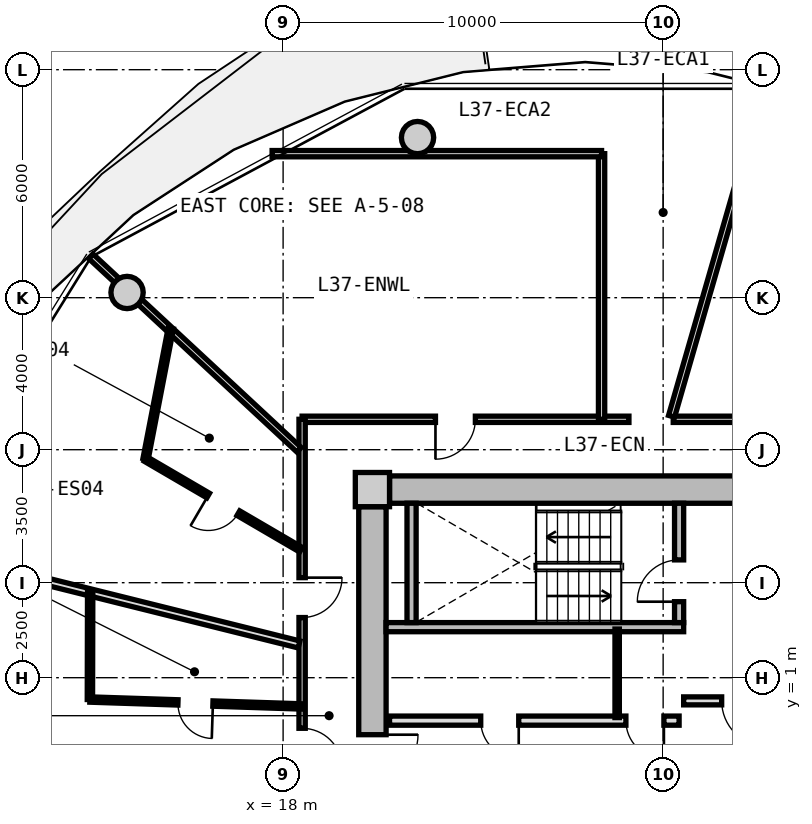
"""IFC4 building model, lengths in metres.
Left out: names, types, materials, properties, quantities, classifications, styles, units other than length and angle.
Written with IfcOpenShell. Run it as: python <this file> out.ifc"""

import sys

from ifc_helpers import new_model, si_unit, direction, frame, frame_2d, origin, origin_2d, place, context, subcontext, project, spatial, rectangle, circle, extrude, source, transform, mapped, element, fill, save


model = new_model("IFC4")
c1 = context("Model", 3, precision=1e-05, world=origin(), true_north=direction((0.0, 1.0)))
c2 = subcontext(c1, "Body", "Model", "MODEL_VIEW")
j1 = project(units=[si_unit("LENGTHUNIT", "METRE"), si_unit("PLANEANGLEUNIT", "RADIAN")], contexts=[c1])
p1 = place(None, origin())
s1 = spatial("IfcSite", under=j1, at=p1, CompositionType="ELEMENT")
p2 = place(p1, origin())
s2 = spatial("IfcBuilding", under=s1, at=p2, CompositionType="ELEMENT")
p3 = place(p2, frame((0.0, 0.0, 120.65)))
s3 = spatial("IfcBuildingStorey", under=s2, at=p3, CompositionType="ELEMENT", Elevation=120.65)
m1 = source(origin(), c2, "Body", "SweptSolid", [
    extrude(rectangle(XDim=0.9, YDim=0.9, at=origin_2d()), origin(), (0.0, 0.0, 1.0), 3.05),
])
p4 = place(p3, frame((20.35, 5.95, 0.0), z_axis=(0.0, 0.0, 1.0), x_axis=(1.0, 0.0, 0.0)))
e1 = element("IfcColumn", 1, at=p4, inside=s3, PredefinedType="COLUMN", context=c2, shape_type="MappedRepresentation", body=[
    mapped(m1, transform((0.0, 0.0, 0.0), x_axis=(1.0, 0.0, 0.0), y_axis=(0.0, 1.0, 0.0), z_axis=(0.0, 0.0, 1.0), scale=1.0)),
])
m2 = source(origin(), c2, "Body", "SweptSolid", [
    extrude(rectangle(XDim=14.4, YDim=0.72, at=frame_2d((7.2, 0.0))), origin(), (0.0, 0.0, 1.0), 2.79),
])
p5 = place(p3, frame((20.8, 5.95, 0.0), z_axis=(0.0, 0.0, 1.0), x_axis=(1.0, 0.0, 0.0)))
e2 = element("IfcWall", 2, at=p5, inside=s3, PredefinedType="SHEAR", context=c2, shape_type="MappedRepresentation", body=[
    mapped(m2, transform((0.0, 0.0, 0.0), x_axis=(1.0, 0.0, 0.0), y_axis=(0.0, 1.0, 0.0), z_axis=(0.0, 0.0, 1.0), scale=1.0)),
])
m3 = source(origin(), c2, "Body", "SweptSolid", [
    extrude(rectangle(XDim=11.0, YDim=0.72, at=frame_2d((5.5, 0.0))), origin(), (0.0, 0.0, 1.0), 2.79),
])
p6 = place(p3, frame((20.35, -5.5, 0.0), z_axis=(0.0, 0.0, 1.0), x_axis=(0.0, 1.0, 0.0)))
e3 = element("IfcWall", 3, at=p6, inside=s3, PredefinedType="SHEAR", context=c2, shape_type="MappedRepresentation", body=[
    mapped(m3, transform((0.0, 0.0, 0.0), x_axis=(1.0, 0.0, 0.0), y_axis=(0.0, 1.0, 0.0), z_axis=(0.0, 0.0, 1.0), scale=1.0)),
])
p7 = place(p6, frame((3.8, 0.0, 0.0)))
e4 = element("IfcOpeningElement", 4, at=p7, cuts=e3, PredefinedType="OPENING", context=c2, shape_type="SweptSolid", body=[
    extrude(rectangle(XDim=1.2, YDim=2.15, at=frame_2d((0.6, 1.075))), frame((0.0, 0.37, 0.0), z_axis=(0.0, -1.0, 0.0), x_axis=(1.0, 0.0, 0.0)), (0.0, 0.0, 1.0), 0.74),
])
m4 = source(origin(), c2, "Body", "SweptSolid", [
    extrude(circle(Radius=0.425, at=origin_2d()), origin(), (0.0, 0.0, 1.0), 3.05),
])
for number, where, z_axis, x_axis in (
    (5, (21.537, 15.213, 0.0), (0.0, 0.0, 1.0), (1.0, 0.0, 0.0)),
    (6, (13.894, 11.137, 0.0), (0.0, 0.0, 1.0), (1.0, 0.0, 0.0)),
):
    element("IfcColumn", number, at=place(p3, frame(where, z_axis=z_axis, x_axis=x_axis)), inside=s3, PredefinedType="COLUMN", context=c2, shape_type="MappedRepresentation", body=[
        mapped(m4, transform((0.0, 0.0, 0.0), x_axis=(1.0, 0.0, 0.0), y_axis=(0.0, 1.0, 0.0), z_axis=(0.0, 0.0, 1.0), scale=1.0)),
    ])
m5 = source(origin(), c2, "Body", "SweptSolid", [
    extrude(rectangle(XDim=7.83, YDim=0.24, at=frame_2d((3.915, 0.0))), origin(), (0.0, 0.0, 1.0), 2.79),
])
p8 = place(p3, frame((20.71, 2.33, 0.0), z_axis=(0.0, 0.0, 1.0), x_axis=(1.0, 0.0, 0.0)))
e7 = element("IfcWall", 7, at=p8, inside=s3, PredefinedType="PARTITIONING", context=c2, shape_type="MappedRepresentation", body=[
    mapped(m5, transform((0.0, 0.0, 0.0), x_axis=(1.0, 0.0, 0.0), y_axis=(0.0, 1.0, 0.0), z_axis=(0.0, 0.0, 1.0), scale=1.0)),
])
m6 = source(origin(), c2, "Body", "SweptSolid", [
    extrude(rectangle(XDim=3.14, YDim=0.24, at=frame_2d((1.57, 0.0))), origin(), (0.0, 0.0, 1.0), 2.79),
])
p9 = place(p3, frame((21.38, 2.45, 0.0), z_axis=(0.0, 0.0, 1.0), x_axis=(0.0, 1.0, 0.0)))
e8 = element("IfcWall", 8, at=p9, inside=s3, PredefinedType="PARTITIONING", context=c2, shape_type="MappedRepresentation", body=[
    mapped(m6, transform((0.0, 0.0, 0.0), x_axis=(1.0, 0.0, 0.0), y_axis=(0.0, 1.0, 0.0), z_axis=(0.0, 0.0, 1.0), scale=1.0)),
])
p10 = place(p3, frame((28.42, 2.45, 0.0), z_axis=(0.0, 0.0, 1.0), x_axis=(0.0, 1.0, 0.0)))
e9 = element("IfcWall", 9, at=p10, inside=s3, PredefinedType="PARTITIONING", context=c2, shape_type="MappedRepresentation", body=[
    mapped(m6, transform((0.0, 0.0, 0.0), x_axis=(1.0, 0.0, 0.0), y_axis=(0.0, 1.0, 0.0), z_axis=(0.0, 0.0, 1.0), scale=1.0)),
])
p11 = place(p10, frame((0.55, 0.0, 0.0)))
e10 = element("IfcOpeningElement", 10, at=p11, cuts=e9, PredefinedType="OPENING", context=c2, shape_type="SweptSolid", body=[
    extrude(rectangle(XDim=1.1, YDim=2.15, at=frame_2d((0.55, 1.075))), frame((0.0, 0.13, 0.0), z_axis=(0.0, -1.0, 0.0), x_axis=(1.0, 0.0, 0.0)), (0.0, 0.0, 1.0), 0.26),
])
m7 = source(origin(), c2, "Body", "SweptSolid", [
    extrude(rectangle(XDim=6.66, YDim=0.21, at=frame_2d((3.33, 0.0))), origin(), (0.0, 0.0, 1.0), 2.775),
])
p12 = place(p3, frame((28.54, 0.39, 0.0), z_axis=(0.0, 0.0, 1.0), x_axis=(1.0, 0.0, 0.0)))
e11 = element("IfcWall", 11, at=p12, inside=s3, PredefinedType="PARTITIONING", context=c2, shape_type="MappedRepresentation", body=[
    mapped(m7, transform((0.0, 0.0, 0.0), x_axis=(1.0, 0.0, 0.0), y_axis=(0.0, 1.0, 0.0), z_axis=(0.0, 0.0, 1.0), scale=1.0)),
])
p13 = place(p12, frame((1.0, 0.0, 0.0)))
e12 = element("IfcOpeningElement", 12, at=p13, cuts=e11, PredefinedType="OPENING", context=c2, shape_type="SweptSolid", body=[
    extrude(rectangle(XDim=1.2, YDim=2.15, at=frame_2d((0.6, 1.075))), frame((0.0, 0.115, 0.0), z_axis=(0.0, -1.0, 0.0), x_axis=(1.0, 0.0, 0.0)), (0.0, 0.0, 1.0), 0.23),
])
m8 = source(origin(), c2, "Body", "SweptSolid", [
    extrude(rectangle(XDim=7.62, YDim=0.24, at=frame_2d((3.81, 0.0))), origin(), (0.0, 0.0, 1.0), 2.775),
])
p14 = place(p3, frame((20.8, -0.13, 0.0), z_axis=(0.0, 0.0, 1.0), x_axis=(1.0, 0.0, 0.0)))
e13 = element("IfcWall", 13, at=p14, inside=s3, PredefinedType="PARTITIONING", context=c2, shape_type="MappedRepresentation", body=[
    mapped(m8, transform((0.0, 0.0, 0.0), x_axis=(1.0, 0.0, 0.0), y_axis=(0.0, 1.0, 0.0), z_axis=(0.0, 0.0, 1.0), scale=1.0)),
])
p15 = place(p14, frame((6.22, 0.0, 0.0)))
e14 = element("IfcOpeningElement", 14, at=p15, cuts=e13, PredefinedType="OPENING", context=c2, shape_type="SweptSolid", body=[
    extrude(rectangle(XDim=1.0, YDim=2.1, at=frame_2d((0.5, 1.05))), frame((0.0, 0.13, 0.0), z_axis=(0.0, -1.0, 0.0), x_axis=(1.0, 0.0, 0.0)), (0.0, 0.0, 1.0), 0.26),
])
p16 = place(p14, frame((2.4, 0.0, 0.0)))
e15 = element("IfcOpeningElement", 15, at=p16, cuts=e13, PredefinedType="OPENING", context=c2, shape_type="SweptSolid", body=[
    extrude(rectangle(XDim=1.0, YDim=2.1, at=frame_2d((0.5, 1.05))), frame((0.0, 0.13, 0.0), z_axis=(0.0, -1.0, 0.0), x_axis=(1.0, 0.0, 0.0)), (0.0, 0.0, 1.0), 0.26),
])
m9 = source(origin(), c2, "Body", "SweptSolid", [
    extrude(rectangle(XDim=2.33, YDim=0.115, at=frame_2d((1.165, 0.0))), origin(), (0.0, 0.0, 1.0), 2.775),
])
p17 = place(p3, frame((26.79, -0.05, 0.0), z_axis=(0.0, 0.0, 1.0), x_axis=(0.0, 1.0, 0.0)))
e16 = element("IfcWall", 16, at=p17, inside=s3, PredefinedType="PARTITIONING", context=c2, shape_type="MappedRepresentation", body=[
    mapped(m9, transform((0.0, 0.0, 0.0), x_axis=(1.0, 0.0, 0.0), y_axis=(0.0, 1.0, 0.0), z_axis=(0.0, 0.0, 1.0), scale=1.0)),
])
m10 = source(origin(), c2, "Body", "SweptSolid", [
    extrude(rectangle(XDim=8.6, YDim=0.165, at=frame_2d((4.3, 0.0))), origin(), (0.0, 0.0, 1.0), 2.775),
])
p18 = place(p3, frame((18.5, 7.8, 0.0), z_axis=(0.0, 0.0, 1.0), x_axis=(1.0, 0.0, 0.0)))
e17 = element("IfcWall", 17, at=p18, inside=s3, PredefinedType="PARTITIONING", context=c2, shape_type="MappedRepresentation", body=[
    mapped(m10, transform((0.0, 0.0, 0.0), x_axis=(1.0, 0.0, 0.0), y_axis=(0.0, 1.0, 0.0), z_axis=(0.0, 0.0, 1.0), scale=1.0)),
])
p19 = place(p18, frame((3.509, 0.0, 0.0)))
e18 = element("IfcOpeningElement", 18, at=p19, cuts=e17, PredefinedType="OPENING", context=c2, shape_type="SweptSolid", body=[
    extrude(rectangle(XDim=1.05, YDim=2.15, at=frame_2d((0.525, 1.075))), frame((0.0, 0.093, 0.0), z_axis=(0.0, -1.0, 0.0), x_axis=(1.0, 0.0, 0.0)), (0.0, 0.0, 1.0), 0.185),
])
m11 = source(origin(), c2, "Body", "SweptSolid", [
    extrude(rectangle(XDim=9.234, YDim=0.165, at=frame_2d((4.617, 0.0))), origin(), (0.0, 0.0, 1.0), 2.775),
])
p20 = place(p3, frame((28.266, 7.8, 0.0), z_axis=(0.0, 0.0, 1.0), x_axis=(1.0, 0.0, 0.0)))
e19 = element("IfcWall", 19, at=p20, inside=s3, PredefinedType="PARTITIONING", context=c2, shape_type="MappedRepresentation", body=[
    mapped(m11, transform((0.0, 0.0, 0.0), x_axis=(1.0, 0.0, 0.0), y_axis=(0.0, 1.0, 0.0), z_axis=(0.0, 0.0, 1.0), scale=1.0)),
])
p21 = place(p20, frame((7.074, 0.0, 0.0)))
e20 = element("IfcOpeningElement", 20, at=p21, cuts=e19, PredefinedType="OPENING", context=c2, shape_type="SweptSolid", body=[
    extrude(rectangle(XDim=0.92, YDim=2.1, at=frame_2d((0.46, 1.05))), frame((0.0, 0.093, 0.0), z_axis=(0.0, -1.0, 0.0), x_axis=(1.0, 0.0, 0.0)), (0.0, 0.0, 1.0), 0.185),
])
p22 = place(p20, frame((2.588, 0.0, 0.0)))
e21 = element("IfcOpeningElement", 21, at=p22, cuts=e19, PredefinedType="OPENING", context=c2, shape_type="SweptSolid", body=[
    extrude(rectangle(XDim=1.25, YDim=2.2, at=frame_2d((0.625, 1.1))), frame((0.0, 0.093, 0.0), z_axis=(0.0, -1.0, 0.0), x_axis=(1.0, 0.0, 0.0)), (0.0, 0.0, 1.0), 0.185),
])
m12 = source(origin(), c2, "Body", "SweptSolid", [
    extrude(rectangle(XDim=15.6, YDim=0.165, at=frame_2d((7.8, 0.0))), origin(), (0.0, 0.0, 1.0), 2.775),
])
p23 = place(p3, frame((18.5, -7.8, 0.0), z_axis=(0.0, 0.0, 1.0), x_axis=(0.0, 1.0, 0.0)))
e22 = element("IfcWall", 22, at=p23, inside=s3, PredefinedType="PARTITIONING", context=c2, shape_type="MappedRepresentation", body=[
    mapped(m12, transform((0.0, 0.0, 0.0), x_axis=(1.0, 0.0, 0.0), y_axis=(0.0, 1.0, 0.0), z_axis=(0.0, 0.0, 1.0), scale=1.0)),
])
p24 = place(p23, frame((10.383, 0.0, 0.0)))
e23 = element("IfcOpeningElement", 23, at=p24, cuts=e22, PredefinedType="OPENING", context=c2, shape_type="SweptSolid", body=[
    extrude(rectangle(XDim=1.05, YDim=2.15, at=frame_2d((0.525, 1.075))), frame((0.0, 0.093, 0.0), z_axis=(0.0, -1.0, 0.0), x_axis=(1.0, 0.0, 0.0)), (0.0, 0.0, 1.0), 0.185),
])
p25 = place(p23, frame((6.419, 0.0, 0.0)))
e24 = element("IfcOpeningElement", 24, at=p25, cuts=e22, PredefinedType="OPENING", context=c2, shape_type="SweptSolid", body=[
    extrude(rectangle(XDim=1.05, YDim=2.15, at=frame_2d((0.525, 1.075))), frame((0.0, 0.093, 0.0), z_axis=(0.0, -1.0, 0.0), x_axis=(1.0, 0.0, 0.0)), (0.0, 0.0, 1.0), 0.185),
])
m13 = source(origin(), c2, "Body", "SweptSolid", [
    extrude(rectangle(XDim=8.989, YDim=0.165, at=frame_2d((4.495, 0.0))), origin(), (0.0, 0.0, 1.0), 2.275),
])
p26 = place(p3, frame((28.222, 7.88, 0.0), z_axis=(0.0, 0.0, 1.0), x_axis=(0.27702323008, 0.960863221274, 0.0)))
e25 = element("IfcWall", 25, at=p26, inside=s3, PredefinedType="PARTITIONING", context=c2, shape_type="MappedRepresentation", body=[
    mapped(m13, transform((0.0, 0.0, 0.0), x_axis=(1.0, 0.0, 0.0), y_axis=(0.0, 1.0, 0.0), z_axis=(0.0, 0.0, 1.0), scale=1.0)),
])
m14 = source(origin(), c2, "Body", "SweptSolid", [
    extrude(rectangle(XDim=7.482, YDim=0.165, at=frame_2d((3.741, 0.0))), origin(), (0.0, 0.0, 1.0), 2.275),
])
p27 = place(p3, frame((18.42, 6.998, 0.0), z_axis=(0.0, 0.0, 1.0), x_axis=(-0.732508698043, 0.680757671489, 0.0)))
e26 = element("IfcWall", 26, at=p27, inside=s3, PredefinedType="PARTITIONING", context=c2, shape_type="MappedRepresentation", body=[
    mapped(m14, transform((0.0, 0.0, 0.0), x_axis=(1.0, 0.0, 0.0), y_axis=(0.0, 1.0, 0.0), z_axis=(0.0, 0.0, 1.0), scale=1.0)),
])
m15 = source(origin(), c2, "Body", "SweptSolid", [
    extrude(rectangle(XDim=6.99, YDim=0.165, at=frame_2d((3.495, 0.0))), origin(), (0.0, 0.0, 1.0), 2.775),
])
p28 = place(p3, frame((26.38, 7.8, 0.0), z_axis=(0.0, 0.0, 1.0), x_axis=(0.0, 1.0, 0.0)))
e27 = element("IfcWall", 27, at=p28, inside=s3, PredefinedType="PARTITIONING", context=c2, shape_type="MappedRepresentation", body=[
    mapped(m15, transform((0.0, 0.0, 0.0), x_axis=(1.0, 0.0, 0.0), y_axis=(0.0, 1.0, 0.0), z_axis=(0.0, 0.0, 1.0), scale=1.0)),
])
m16 = source(origin(), c2, "Body", "SweptSolid", [
    extrude(rectangle(XDim=8.669, YDim=0.165, at=frame_2d((4.335, 0.0))), origin(), (0.0, 0.0, 1.0), 2.775),
])
p29 = place(p3, frame((17.71, 14.79, 0.0), z_axis=(0.0, 0.0, 1.0), x_axis=(1.0, 0.0, 0.0)))
e28 = element("IfcWall", 28, at=p29, inside=s3, PredefinedType="PARTITIONING", context=c2, shape_type="MappedRepresentation", body=[
    mapped(m16, transform((0.0, 0.0, 0.0), x_axis=(1.0, 0.0, 0.0), y_axis=(0.0, 1.0, 0.0), z_axis=(0.0, 0.0, 1.0), scale=1.0)),
])
m17 = source(origin(), c2, "Body", "SweptSolid", [
    extrude(rectangle(XDim=10.556, YDim=0.19, at=frame_2d((5.278, 0.0))), origin(), (0.0, 0.0, 1.0), 2.275),
])
p30 = place(p3, frame((18.42, 1.875, 0.0), z_axis=(0.0, 0.0, 1.0), x_axis=(-0.970363857851, 0.241648470667, 0.0)))
e29 = element("IfcWall", 29, at=p30, inside=s3, PredefinedType="PARTITIONING", context=c2, shape_type="MappedRepresentation", body=[
    mapped(m17, transform((0.0, 0.0, 0.0), x_axis=(1.0, 0.0, 0.0), y_axis=(0.0, 1.0, 0.0), z_axis=(0.0, 0.0, 1.0), scale=1.0)),
])
m18 = source(origin(), c2, "Body", "SweptSolid", [
    extrude(rectangle(XDim=4.735, YDim=0.14, at=frame_2d((2.368, 0.0))), origin(), (0.0, 0.0, 1.0), 2.775),
])
p31 = place(p3, frame((18.47, 4.368, 0.0), z_axis=(0.0, 0.0, 1.0), x_axis=(-0.863537576642, 0.504284496814, 0.0)))
e30 = element("IfcWall", 30, at=p31, inside=s3, PredefinedType="PARTITIONING", context=c2, shape_type="MappedRepresentation", body=[
    mapped(m18, transform((0.0, 0.0, 0.0), x_axis=(1.0, 0.0, 0.0), y_axis=(0.0, 1.0, 0.0), z_axis=(0.0, 0.0, 1.0), scale=1.0)),
])
p32 = place(p31, frame((1.908, 0.0, 0.0)))
e31 = element("IfcOpeningElement", 31, at=p32, cuts=e30, PredefinedType="OPENING", context=c2, shape_type="SweptSolid", body=[
    extrude(rectangle(XDim=0.92, YDim=2.1, at=frame_2d((0.46, 1.05))), frame((0.0, 0.08, 0.0), z_axis=(0.0, -1.0, 0.0), x_axis=(1.0, 0.0, 0.0)), (0.0, 0.0, 1.0), 0.16),
])
m19 = source(origin(), c2, "Body", "SweptSolid", [
    extrude(rectangle(XDim=3.499, YDim=0.14, at=frame_2d((1.75, 0.0))), origin(), (0.0, 0.0, 1.0), 2.775),
])
p33 = place(p3, frame((14.381, 6.756, 0.0), z_axis=(0.0, 0.0, 1.0), x_axis=(0.18957713629, 0.981865830649, 0.0)))
e32 = element("IfcWall", 32, at=p33, inside=s3, PredefinedType="PARTITIONING", context=c2, shape_type="MappedRepresentation", body=[
    mapped(m19, transform((0.0, 0.0, 0.0), x_axis=(1.0, 0.0, 0.0), y_axis=(0.0, 1.0, 0.0), z_axis=(0.0, 0.0, 1.0), scale=1.0)),
])
m20 = source(origin(), c2, "Body", "SweptSolid", [
    extrude(rectangle(XDim=5.557, YDim=0.14, at=frame_2d((2.778, 0.0))), origin(), (0.0, 0.0, 1.0), 2.775),
])
p34 = place(p3, frame((18.47, 0.244, 0.0), z_axis=(0.0, 0.0, 1.0), x_axis=(-0.999468495627, 0.03259948234, 0.0)))
e33 = element("IfcWall", 33, at=p34, inside=s3, PredefinedType="PARTITIONING", context=c2, shape_type="MappedRepresentation", body=[
    mapped(m20, transform((0.0, 0.0, 0.0), x_axis=(1.0, 0.0, 0.0), y_axis=(0.0, 1.0, 0.0), z_axis=(0.0, 0.0, 1.0), scale=1.0)),
])
p35 = place(p34, frame((2.318, 0.0, 0.0)))
e34 = element("IfcOpeningElement", 34, at=p35, cuts=e33, PredefinedType="OPENING", context=c2, shape_type="SweptSolid", body=[
    extrude(rectangle(XDim=0.92, YDim=2.1, at=frame_2d((0.46, 1.05))), frame((0.0, 0.08, 0.0), z_axis=(0.0, -1.0, 0.0), x_axis=(1.0, 0.0, 0.0)), (0.0, 0.0, 1.0), 0.16),
])
m21 = source(origin(), c2, "Body", "SweptSolid", [
    extrude(rectangle(XDim=2.837, YDim=0.14, at=frame_2d((1.418, 0.0))), origin(), (0.0, 0.0, 1.0), 2.775),
])
p36 = place(p3, frame((12.916, 0.425, 0.0), z_axis=(0.0, 0.0, 1.0), x_axis=(0.002409838945, 0.999997096334, 0.0)))
e35 = element("IfcWall", 35, at=p36, inside=s3, PredefinedType="PARTITIONING", context=c2, shape_type="MappedRepresentation", body=[
    mapped(m21, transform((0.0, 0.0, 0.0), x_axis=(1.0, 0.0, 0.0), y_axis=(0.0, 1.0, 0.0), z_axis=(0.0, 0.0, 1.0), scale=1.0)),
])
m22 = source(origin(), c2, "Body", "SweptSolid", [
    extrude(rectangle(XDim=1.1, YDim=2.15, at=frame_2d((0.55, 1.075))), frame((0.0, 0.025, 0.0), z_axis=(0.0, -1.0, 0.0), x_axis=(1.0, 0.0, 0.0)), (0.0, 0.0, 1.0), 0.05),
])
p37 = place(p11, origin())
e36 = element("IfcDoor", 36, at=p37, inside=s3, OperationType="SINGLE_SWING_LEFT", PredefinedType="DOOR", context=c2, shape_type="MappedRepresentation", body=[
    mapped(m22, transform((0.0, 0.0, 0.0), x_axis=(1.0, 0.0, 0.0), y_axis=(0.0, 1.0, 0.0), z_axis=(0.0, 0.0, 1.0), scale=1.0)),
])
fill(e10, e36)
m23 = source(origin(), c2, "Body", "SweptSolid", [
    extrude(rectangle(XDim=1.2, YDim=2.15, at=frame_2d((0.6, 1.075))), frame((0.0, 0.025, 0.0), z_axis=(0.0, -1.0, 0.0), x_axis=(1.0, 0.0, 0.0)), (0.0, 0.0, 1.0), 0.05),
])
p38 = place(p13, frame((1.2, 0.0, 0.0), z_axis=(0.0, 0.0, 1.0), x_axis=(-1.0, 0.0, 0.0)))
e37 = element("IfcDoor", 37, at=p38, inside=s3, OperationType="SINGLE_SWING_LEFT", PredefinedType="DOOR", context=c2, shape_type="MappedRepresentation", body=[
    mapped(m23, transform((0.0, 0.0, 0.0), x_axis=(1.0, 0.0, 0.0), y_axis=(0.0, 1.0, 0.0), z_axis=(0.0, 0.0, 1.0), scale=1.0)),
])
fill(e12, e37)
p39 = place(p7, frame((1.2, 0.0, 0.0), z_axis=(0.0, 0.0, 1.0), x_axis=(-1.0, 0.0, 0.0)))
e38 = element("IfcDoor", 38, at=p39, inside=s3, OperationType="SINGLE_SWING_LEFT", PredefinedType="DOOR", context=c2, shape_type="MappedRepresentation", body=[
    mapped(m23, transform((0.0, 0.0, 0.0), x_axis=(1.0, 0.0, 0.0), y_axis=(0.0, 1.0, 0.0), z_axis=(0.0, 0.0, 1.0), scale=1.0)),
])
fill(e4, e38)
m24 = source(origin(), c2, "Body", "SweptSolid", [
    extrude(rectangle(XDim=1.0, YDim=2.1, at=frame_2d((0.5, 1.05))), frame((0.0, 0.025, 0.0), z_axis=(0.0, -1.0, 0.0), x_axis=(1.0, 0.0, 0.0)), (0.0, 0.0, 1.0), 0.05),
])
p40 = place(p15, frame((1.0, 0.0, 0.0), z_axis=(0.0, 0.0, 1.0), x_axis=(-1.0, 0.0, 0.0)))
e39 = element("IfcDoor", 39, at=p40, inside=s3, OperationType="SINGLE_SWING_LEFT", PredefinedType="DOOR", context=c2, shape_type="MappedRepresentation", body=[
    mapped(m24, transform((0.0, 0.0, 0.0), x_axis=(1.0, 0.0, 0.0), y_axis=(0.0, 1.0, 0.0), z_axis=(0.0, 0.0, 1.0), scale=1.0)),
])
fill(e14, e39)
p41 = place(p16, frame((1.0, 0.0, 0.0), z_axis=(0.0, 0.0, 1.0), x_axis=(-1.0, 0.0, 0.0)))
e40 = element("IfcDoor", 40, at=p41, inside=s3, OperationType="SINGLE_SWING_LEFT", PredefinedType="DOOR", context=c2, shape_type="MappedRepresentation", body=[
    mapped(m24, transform((0.0, 0.0, 0.0), x_axis=(1.0, 0.0, 0.0), y_axis=(0.0, 1.0, 0.0), z_axis=(0.0, 0.0, 1.0), scale=1.0)),
])
fill(e15, e40)
m25 = source(origin(), c2, "Body", "SweptSolid", [
    extrude(rectangle(XDim=1.05, YDim=2.15, at=frame_2d((0.525, 1.075))), frame((0.0, 0.025, 0.0), z_axis=(0.0, -1.0, 0.0), x_axis=(1.0, 0.0, 0.0)), (0.0, 0.0, 1.0), 0.05),
])
p42 = place(p19, frame((1.05, 0.0, 0.0), z_axis=(0.0, 0.0, 1.0), x_axis=(-1.0, 0.0, 0.0)))
e41 = element("IfcDoor", 41, at=p42, inside=s3, OperationType="SINGLE_SWING_RIGHT", PredefinedType="DOOR", context=c2, shape_type="MappedRepresentation", body=[
    mapped(m25, transform((0.0, 0.0, 0.0), x_axis=(1.0, 0.0, 0.0), y_axis=(0.0, 1.0, 0.0), z_axis=(0.0, 0.0, 1.0), scale=1.0)),
])
fill(e18, e41)
p43 = place(p24, frame((1.05, 0.0, 0.0), z_axis=(0.0, 0.0, 1.0), x_axis=(-1.0, 0.0, 0.0)))
e42 = element("IfcDoor", 42, at=p43, inside=s3, OperationType="SINGLE_SWING_LEFT", PredefinedType="DOOR", context=c2, shape_type="MappedRepresentation", body=[
    mapped(m25, transform((0.0, 0.0, 0.0), x_axis=(1.0, 0.0, 0.0), y_axis=(0.0, 1.0, 0.0), z_axis=(0.0, 0.0, 1.0), scale=1.0)),
])
fill(e23, e42)
m26 = source(origin(), c2, "Body", "SweptSolid", [
    extrude(rectangle(XDim=0.92, YDim=2.1, at=frame_2d((0.46, 1.05))), frame((0.0, 0.025, 0.0), z_axis=(0.0, -1.0, 0.0), x_axis=(1.0, 0.0, 0.0)), (0.0, 0.0, 1.0), 0.05),
])
p44 = place(p32, origin())
e43 = element("IfcDoor", 43, at=p44, inside=s3, OperationType="SINGLE_SWING_RIGHT", PredefinedType="DOOR", context=c2, shape_type="MappedRepresentation", body=[
    mapped(m26, transform((0.0, 0.0, 0.0), x_axis=(1.0, 0.0, 0.0), y_axis=(0.0, 1.0, 0.0), z_axis=(0.0, 0.0, 1.0), scale=1.0)),
])
fill(e31, e43)
p45 = place(p25, frame((1.05, 0.0, 0.0), z_axis=(0.0, 0.0, 1.0), x_axis=(-1.0, 0.0, 0.0)))
e44 = element("IfcDoor", 44, at=p45, inside=s3, OperationType="SINGLE_SWING_RIGHT", PredefinedType="DOOR", context=c2, shape_type="MappedRepresentation", body=[
    mapped(m25, transform((0.0, 0.0, 0.0), x_axis=(1.0, 0.0, 0.0), y_axis=(0.0, 1.0, 0.0), z_axis=(0.0, 0.0, 1.0), scale=1.0)),
])
fill(e24, e44)
p46 = place(p35, origin())
e45 = element("IfcDoor", 45, at=p46, inside=s3, OperationType="SINGLE_SWING_LEFT", PredefinedType="DOOR", context=c2, shape_type="MappedRepresentation", body=[
    mapped(m26, transform((0.0, 0.0, 0.0), x_axis=(1.0, 0.0, 0.0), y_axis=(0.0, 1.0, 0.0), z_axis=(0.0, 0.0, 1.0), scale=1.0)),
])
fill(e34, e45)
save(model, sys.argv[1])
